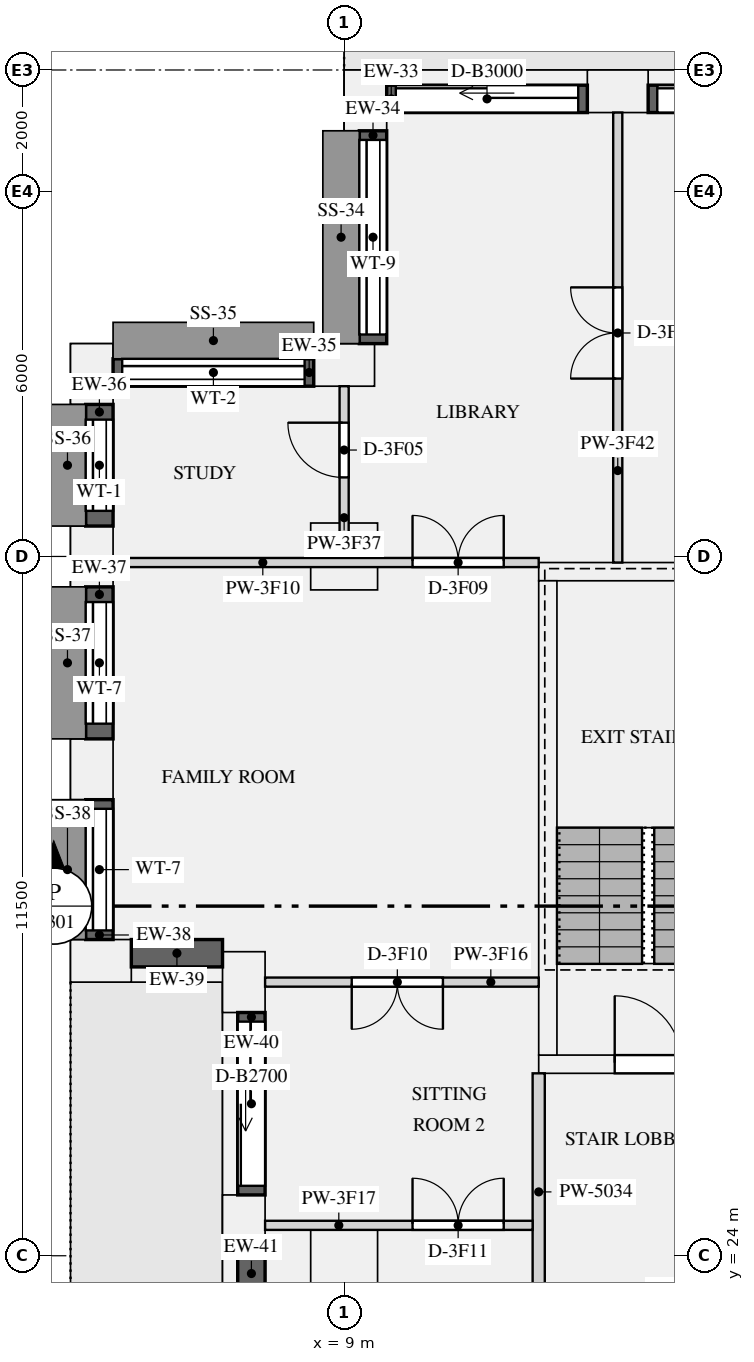
"""IFC4 building model, lengths in metres.
Left out: names, types, materials, properties, quantities, classifications, styles, units other than length and angle.
Written with IfcOpenShell. Run it as: python <this file> out.ifc"""

import sys

from ifc_helpers import new_model, si_unit, direction, frame, frame_2d, origin, origin_2d, place, context, subcontext, project, spatial, rectangle, extrude, element, fill, save


model = new_model("IFC4")
c1 = context("Model", 3, precision=1e-05, world=origin(), true_north=direction((0.0, 1.0)))
c2 = subcontext(c1, "Body", "Model", "MODEL_VIEW")
j1 = project(units=[si_unit("LENGTHUNIT", "METRE"), si_unit("PLANEANGLEUNIT", "RADIAN")], contexts=[c1])
p1 = place(None, origin())
s1 = spatial("IfcSite", under=j1, at=p1, CompositionType="ELEMENT")
p2 = place(p1, origin())
s2 = spatial("IfcBuilding", under=s1, at=p2, CompositionType="ELEMENT")
p3 = place(p2, frame((0.0, 0.0, 182.25)))
s3 = spatial("IfcBuildingStorey", under=s2, at=p3, CompositionType="ELEMENT", Elevation=182.25)
p4 = place(p3, frame((13.5, 43.15, 0.0), z_axis=(0.0, 0.0, 1.0), x_axis=(-1.0, 0.0, 0.0)))
e1 = element("IfcColumn", 1, at=p4, inside=s3, PredefinedType="USERDEFINED", context=c2, shape_type="SweptSolid", body=[
    extrude(rectangle(XDim=1.0, YDim=0.7, at=origin_2d()), origin(), (0.0, 0.0, 1.0), 2.65),
])
p5 = place(p3, frame((9.35, 43.0, 0.0), z_axis=(0.0, 0.0, 1.0), x_axis=(0.0, -1.0, 0.0)))
e2 = element("IfcColumn", 2, at=p5, inside=s3, PredefinedType="USERDEFINED", context=c2, shape_type="SweptSolid", body=[
    extrude(rectangle(XDim=1.0, YDim=0.7, at=origin_2d()), origin(), (0.0, 0.0, 1.0), 3.15),
])
p6 = place(p3, frame((9.0, 38.65, 0.0), z_axis=(0.0, 0.0, 1.0), x_axis=(-1.0, 0.0, 0.0)))
e3 = element("IfcColumn", 3, at=p6, inside=s3, PredefinedType="USERDEFINED", context=c2, shape_type="SweptSolid", body=[
    extrude(rectangle(XDim=1.0, YDim=0.7, at=origin_2d()), origin(), (0.0, 0.0, 1.0), 2.65),
])
p7 = place(p3, frame((4.85, 38.5, 0.0), z_axis=(0.0, 0.0, 1.0), x_axis=(0.0, -1.0, 0.0)))
e4 = element("IfcColumn", 4, at=p7, inside=s3, PredefinedType="USERDEFINED", context=c2, shape_type="SweptSolid", body=[
    extrude(rectangle(XDim=1.0, YDim=0.7, at=origin_2d()), origin(), (0.0, 0.0, 1.0), 3.15),
])
for number, where, z_axis, x_axis in (
    (5, (4.85, 35.5, 0.0), (0.0, 0.0, 1.0), (0.0, -1.0, 0.0)),
    (6, (4.85, 32.0, 0.0), (0.0, 0.0, 1.0), (0.0, -1.0, 0.0)),
    (7, (5.0, 28.85, 0.0), (0.0, 0.0, 1.0), (1.0, 0.0, 0.0)),
    (8, (7.35, 28.5, 0.0), (0.0, 0.0, 1.0), (0.0, -1.0, 0.0)),
    (9, (7.35, 24.5, 0.0), (0.0, 0.0, 1.0), (0.0, -1.0, 0.0)),
):
    element("IfcColumn", number, at=place(p3, frame(where, z_axis=z_axis, x_axis=x_axis)), inside=s3, PredefinedType="USERDEFINED", context=c2, shape_type="SweptSolid", body=[
        extrude(rectangle(XDim=1.0, YDim=0.7, at=origin_2d()), origin(), (0.0, 0.0, 1.0), 2.65),
    ])
for number, where, z_axis, x_axis in (
    (10, (9.0, 24.0, 0.0), (0.0, 0.0, 1.0), (1.0, 0.0, 0.0)),
    (11, (9.0, 35.5, 0.0), (0.0, 0.0, 1.0), (1.0, 0.0, 0.0)),
):
    element("IfcColumn", number, at=place(p3, frame(where, z_axis=z_axis, x_axis=x_axis)), inside=s3, PredefinedType="COLUMN", context=c2, shape_type="SweptSolid", body=[
        extrude(rectangle(XDim=1.1, YDim=1.1, at=origin_2d()), origin(), (0.0, 0.0, 1.0), 3.15),
    ])
p8 = place(p3, frame((12.2, 27.15, 0.0), z_axis=(0.0, 0.0, 1.0), x_axis=(1.0, 0.0, 0.0)))
e12 = element("IfcWall", 12, at=p8, inside=s3, PredefinedType="SHEAR", context=c2, shape_type="SweptSolid", body=[
    extrude(rectangle(XDim=3.6, YDim=0.3, at=frame_2d((1.8, 0.0))), origin(), (0.0, 0.0, 1.0), 3.15),
])
p9 = place(p8, frame((1.25, 0.0, 0.0)))
e13 = element("IfcOpeningElement", 13, at=p9, cuts=e12, PredefinedType="OPENING", context=c2, shape_type="SweptSolid", body=[
    extrude(rectangle(XDim=1.1, YDim=2.1, at=frame_2d((0.55, 1.05))), frame((0.0, 0.16, 0.0), z_axis=(0.0, -1.0, 0.0), x_axis=(1.0, 0.0, 0.0)), (0.0, 0.0, 1.0), 0.32),
])
p10 = place(p3, frame((12.2, 35.25, 0.0), z_axis=(0.0, 0.0, 1.0), x_axis=(1.0, 0.0, 0.0)))
e14 = element("IfcWall", 14, at=p10, inside=s3, PredefinedType="SHEAR", context=c2, shape_type="SweptSolid", body=[
    extrude(rectangle(XDim=3.6, YDim=0.3, at=frame_2d((1.8, 0.0))), origin(), (0.0, 0.0, 1.0), 3.15),
])
p11 = place(p3, frame((12.35, 27.3, 0.0), z_axis=(0.0, 0.0, 1.0), x_axis=(0.0, 1.0, 0.0)))
e15 = element("IfcWall", 15, at=p11, inside=s3, PredefinedType="SHEAR", context=c2, shape_type="SweptSolid", body=[
    extrude(rectangle(XDim=7.8, YDim=0.3, at=frame_2d((3.9, 0.0))), origin(), (0.0, 0.0, 1.0), 3.15),
])
p12 = place(p3, frame((17.5, 43.025, 0.0), z_axis=(0.0, 0.0, 1.0), x_axis=(-1.0, 0.0, 0.0)))
e16 = element("IfcWall", 16, at=p12, inside=s3, PredefinedType="SOLIDWALL", context=c2, shape_type="SweptSolid", body=[
    extrude(rectangle(XDim=3.5, YDim=0.45, at=frame_2d((1.75, 0.0))), origin(), (0.0, 0.0, 1.0), 2.65),
])
p13 = place(p12, frame((0.15, 0.0, 0.0)))
e17 = element("IfcOpeningElement", 17, at=p13, cuts=e16, PredefinedType="OPENING", context=c2, shape_type="SweptSolid", body=[
    extrude(rectangle(XDim=3.2, YDim=2.3, at=frame_2d((1.6, 1.15))), frame((0.0, 0.235, 0.0), z_axis=(0.0, -1.0, 0.0), x_axis=(1.0, 0.0, 0.0)), (0.0, 0.0, 1.0), 0.47),
])
p14 = place(p3, frame((13.0, 43.025, 0.0), z_axis=(0.0, 0.0, 1.0), x_axis=(-1.0, 0.0, 0.0)))
e18 = element("IfcWall", 18, at=p14, inside=s3, PredefinedType="SOLIDWALL", context=c2, shape_type="SweptSolid", body=[
    extrude(rectangle(XDim=3.3, YDim=0.45, at=frame_2d((1.65, 0.0))), origin(), (0.0, 0.0, 1.0), 2.65),
])
p15 = place(p14, frame((0.15, 0.0, 0.0)))
e19 = element("IfcOpeningElement", 19, at=p15, cuts=e18, PredefinedType="OPENING", context=c2, shape_type="SweptSolid", body=[
    extrude(rectangle(XDim=3.0, YDim=2.3, at=frame_2d((1.5, 1.15))), frame((0.0, 0.235, 0.0), z_axis=(0.0, -1.0, 0.0), x_axis=(1.0, 0.0, 0.0)), (0.0, 0.0, 1.0), 0.47),
])
p16 = place(p3, frame((9.475, 42.5, 0.9), z_axis=(0.0, 0.0, 1.0), x_axis=(0.0, -1.0, 0.0)))
e20 = element("IfcWall", 20, at=p16, inside=s3, PredefinedType="SOLIDWALL", context=c2, shape_type="SweptSolid", body=[
    extrude(rectangle(XDim=3.5, YDim=0.45, at=frame_2d((1.75, 0.0))), origin(), (0.0, 0.0, 1.0), 1.75),
])
p17 = place(p16, frame((0.15, 0.0, 0.15)))
e21 = element("IfcOpeningElement", 21, at=p17, cuts=e20, PredefinedType="OPENING", context=c2, shape_type="SweptSolid", body=[
    extrude(rectangle(XDim=3.2, YDim=1.5, at=frame_2d((1.6, 0.75))), frame((0.0, 0.235, 0.0), z_axis=(0.0, -1.0, 0.0), x_axis=(1.0, 0.0, 0.0)), (0.0, 0.0, 1.0), 0.47),
])
p18 = place(p3, frame((8.5, 38.525, 0.9), z_axis=(0.0, 0.0, 1.0), x_axis=(-1.0, 0.0, 0.0)))
e22 = element("IfcWall", 22, at=p18, inside=s3, PredefinedType="SOLIDWALL", context=c2, shape_type="SweptSolid", body=[
    extrude(rectangle(XDim=3.3, YDim=0.45, at=frame_2d((1.65, 0.0))), origin(), (0.0, 0.0, 1.0), 1.75),
])
p19 = place(p18, frame((0.15, 0.0, 0.15)))
e23 = element("IfcOpeningElement", 23, at=p19, cuts=e22, PredefinedType="OPENING", context=c2, shape_type="SweptSolid", body=[
    extrude(rectangle(XDim=3.0, YDim=1.5, at=frame_2d((1.5, 0.75))), frame((0.0, 0.235, 0.0), z_axis=(0.0, -1.0, 0.0), x_axis=(1.0, 0.0, 0.0)), (0.0, 0.0, 1.0), 0.47),
])
p20 = place(p3, frame((4.975, 38.0, 0.9), z_axis=(0.0, 0.0, 1.0), x_axis=(0.0, -1.0, 0.0)))
e24 = element("IfcWall", 24, at=p20, inside=s3, PredefinedType="SOLIDWALL", context=c2, shape_type="SweptSolid", body=[
    extrude(rectangle(XDim=2.0, YDim=0.45, at=frame_2d((1.0, 0.0))), origin(), (0.0, 0.0, 1.0), 1.75),
])
p21 = place(p20, frame((0.25, 0.0, 0.15)))
e25 = element("IfcOpeningElement", 25, at=p21, cuts=e24, PredefinedType="OPENING", context=c2, shape_type="SweptSolid", body=[
    extrude(rectangle(XDim=1.5, YDim=1.5, at=frame_2d((0.75, 0.75))), frame((0.0, 0.235, 0.0), z_axis=(0.0, -1.0, 0.0), x_axis=(1.0, 0.0, 0.0)), (0.0, 0.0, 1.0), 0.47),
])
p22 = place(p3, frame((4.975, 35.0, 0.9), z_axis=(0.0, 0.0, 1.0), x_axis=(0.0, -1.0, 0.0)))
e26 = element("IfcWall", 26, at=p22, inside=s3, PredefinedType="SOLIDWALL", context=c2, shape_type="SweptSolid", body=[
    extrude(rectangle(XDim=2.5, YDim=0.45, at=frame_2d((1.25, 0.0))), origin(), (0.0, 0.0, 1.0), 1.75),
])
p23 = place(p22, frame((0.25, 0.0, 0.15)))
e27 = element("IfcOpeningElement", 27, at=p23, cuts=e26, PredefinedType="OPENING", context=c2, shape_type="SweptSolid", body=[
    extrude(rectangle(XDim=2.0, YDim=1.5, at=frame_2d((1.0, 0.75))), frame((0.0, 0.235, 0.0), z_axis=(0.0, -1.0, 0.0), x_axis=(1.0, 0.0, 0.0)), (0.0, 0.0, 1.0), 0.47),
])
p24 = place(p3, frame((4.975, 31.5, 0.9), z_axis=(0.0, 0.0, 1.0), x_axis=(0.0, -1.0, 0.0)))
e28 = element("IfcWall", 28, at=p24, inside=s3, PredefinedType="SOLIDWALL", context=c2, shape_type="SweptSolid", body=[
    extrude(rectangle(XDim=2.3, YDim=0.45, at=frame_2d((1.15, 0.0))), origin(), (0.0, 0.0, 1.0), 1.75),
])
p25 = place(p24, frame((0.15, 0.0, 0.15)))
e29 = element("IfcOpeningElement", 29, at=p25, cuts=e28, PredefinedType="OPENING", context=c2, shape_type="SweptSolid", body=[
    extrude(rectangle(XDim=2.0, YDim=1.5, at=frame_2d((1.0, 0.75))), frame((0.0, 0.235, 0.0), z_axis=(0.0, -1.0, 0.0), x_axis=(1.0, 0.0, 0.0)), (0.0, 0.0, 1.0), 0.47),
])
p26 = place(p3, frame((5.5, 28.975, 0.9), z_axis=(0.0, 0.0, 1.0), x_axis=(1.0, 0.0, 0.0)))
e30 = element("IfcWall", 30, at=p26, inside=s3, PredefinedType="SOLIDWALL", context=c2, shape_type="SweptSolid", body=[
    extrude(rectangle(XDim=1.5, YDim=0.45, at=frame_2d((0.75, 0.0))), origin(), (0.0, 0.0, 1.0), 1.75),
])
p27 = place(p3, frame((7.475, 28.0, 0.0), z_axis=(0.0, 0.0, 1.0), x_axis=(0.0, -1.0, 0.0)))
e31 = element("IfcWall", 31, at=p27, inside=s3, PredefinedType="SOLIDWALL", context=c2, shape_type="SweptSolid", body=[
    extrude(rectangle(XDim=3.0, YDim=0.45, at=frame_2d((1.5, 0.0))), origin(), (0.0, 0.0, 1.0), 2.65),
])
p28 = place(p27, frame((0.15, 0.0, 0.0)))
e32 = element("IfcOpeningElement", 32, at=p28, cuts=e31, PredefinedType="OPENING", context=c2, shape_type="SweptSolid", body=[
    extrude(rectangle(XDim=2.7, YDim=2.3, at=frame_2d((1.35, 1.15))), frame((0.0, 0.235, 0.0), z_axis=(0.0, -1.0, 0.0), x_axis=(1.0, 0.0, 0.0)), (0.0, 0.0, 1.0), 0.47),
])
p29 = place(p3, frame((7.475, 24.0, 0.0), z_axis=(0.0, 0.0, 1.0), x_axis=(0.0, -1.0, 0.0)))
e33 = element("IfcWall", 33, at=p29, inside=s3, PredefinedType="SOLIDWALL", context=c2, shape_type="SweptSolid", body=[
    extrude(rectangle(XDim=3.0, YDim=0.45, at=frame_2d((1.5, 0.0))), origin(), (0.0, 0.0, 1.0), 2.65),
])
p30 = place(p29, frame((0.585, 0.0, 0.0)))
e34 = element("IfcOpeningElement", 34, at=p30, cuts=e33, PredefinedType="OPENING", context=c2, shape_type="SweptSolid", body=[
    extrude(rectangle(XDim=2.25, YDim=2.3, at=frame_2d((1.125, 1.15))), frame((0.0, 0.235, 0.0), z_axis=(0.0, -1.0, 0.0), x_axis=(1.0, 0.0, 0.0)), (0.0, 0.0, 1.0), 0.47),
])
p31 = place(p3, frame((12.2, 23.1, 0.0), z_axis=(0.0, 0.0, 1.0), x_axis=(0.0, 1.0, 0.0)))
e35 = element("IfcWall", 35, at=p31, inside=s3, PredefinedType="PARTITIONING", context=c2, shape_type="SweptSolid", body=[
    extrude(rectangle(XDim=3.9, YDim=0.2, at=frame_2d((1.95, 0.0))), origin(), (0.0, 0.0, 1.0), 2.65),
])
p32 = place(p3, frame((5.2, 35.4, 0.0), z_axis=(0.0, 0.0, 1.0), x_axis=(1.0, 0.0, 0.0)))
e36 = element("IfcWall", 36, at=p32, inside=s3, PredefinedType="PARTITIONING", context=c2, shape_type="SweptSolid", body=[
    extrude(rectangle(XDim=7.0, YDim=0.15, at=frame_2d((3.5, 0.0))), origin(), (0.0, 0.0, 1.0), 2.65),
])
p33 = place(p32, frame((4.925, 0.0, 0.0)))
e37 = element("IfcOpeningElement", 37, at=p33, cuts=e36, PredefinedType="OPENING", context=c2, shape_type="SweptSolid", body=[
    extrude(rectangle(XDim=1.5, YDim=2.1, at=frame_2d((0.75, 1.05))), frame((0.0, 0.085, 0.0), z_axis=(0.0, -1.0, 0.0), x_axis=(1.0, 0.0, 0.0)), (0.0, 0.0, 1.0), 0.17),
])
p34 = place(p3, frame((7.7, 28.5, 0.0), z_axis=(0.0, 0.0, 1.0), x_axis=(1.0, 0.0, 0.0)))
e38 = element("IfcWall", 38, at=p34, inside=s3, PredefinedType="PARTITIONING", context=c2, shape_type="SweptSolid", body=[
    extrude(rectangle(XDim=4.5, YDim=0.15, at=frame_2d((2.25, 0.0))), origin(), (0.0, 0.0, 1.0), 2.65),
])
p35 = place(p34, frame((1.425, 0.0, 0.0)))
e39 = element("IfcOpeningElement", 39, at=p35, cuts=e38, PredefinedType="OPENING", context=c2, shape_type="SweptSolid", body=[
    extrude(rectangle(XDim=1.5, YDim=2.1, at=frame_2d((0.75, 1.05))), frame((0.0, 0.085, 0.0), z_axis=(0.0, -1.0, 0.0), x_axis=(1.0, 0.0, 0.0)), (0.0, 0.0, 1.0), 0.17),
])
p36 = place(p3, frame((7.7, 24.5, 0.0), z_axis=(0.0, 0.0, 1.0), x_axis=(1.0, 0.0, 0.0)))
e40 = element("IfcWall", 40, at=p36, inside=s3, PredefinedType="PARTITIONING", context=c2, shape_type="SweptSolid", body=[
    extrude(rectangle(XDim=4.4, YDim=0.15, at=frame_2d((2.2, 0.0))), origin(), (0.0, 0.0, 1.0), 2.65),
])
p37 = place(p36, frame((2.425, 0.0, 0.0)))
e41 = element("IfcOpeningElement", 41, at=p37, cuts=e40, PredefinedType="OPENING", context=c2, shape_type="SweptSolid", body=[
    extrude(rectangle(XDim=1.5, YDim=2.1, at=frame_2d((0.75, 1.05))), frame((0.0, 0.085, 0.0), z_axis=(0.0, -1.0, 0.0), x_axis=(1.0, 0.0, 0.0)), (0.0, 0.0, 1.0), 0.17),
])
p38 = place(p3, frame((9.0, 35.475, 0.0), z_axis=(0.0, 0.0, 1.0), x_axis=(0.0, 1.0, 0.0)))
e42 = element("IfcWall", 42, at=p38, inside=s3, PredefinedType="PARTITIONING", context=c2, shape_type="SweptSolid", body=[
    extrude(rectangle(XDim=2.825, YDim=0.15, at=frame_2d((1.413, 0.0))), origin(), (0.0, 0.0, 1.0), 2.65),
])
p39 = place(p38, frame((1.325, 0.0, 0.0)))
e43 = element("IfcOpeningElement", 43, at=p39, cuts=e42, PredefinedType="OPENING", context=c2, shape_type="SweptSolid", body=[
    extrude(rectangle(XDim=0.9, YDim=2.1, at=frame_2d((0.45, 1.05))), frame((0.0, 0.085, 0.0), z_axis=(0.0, -1.0, 0.0), x_axis=(1.0, 0.0, 0.0)), (0.0, 0.0, 1.0), 0.17),
])
p40 = place(p3, frame((13.5, 35.4, 0.0), z_axis=(0.0, 0.0, 1.0), x_axis=(0.0, 1.0, 0.0)))
e44 = element("IfcWall", 44, at=p40, inside=s3, PredefinedType="PARTITIONING", context=c2, shape_type="SweptSolid", body=[
    extrude(rectangle(XDim=7.4, YDim=0.15, at=frame_2d((3.7, 0.0))), origin(), (0.0, 0.0, 1.0), 2.65),
])
p41 = place(p40, frame((3.025, 0.0, 0.0)))
e45 = element("IfcOpeningElement", 45, at=p41, cuts=e44, PredefinedType="OPENING", context=c2, shape_type="SweptSolid", body=[
    extrude(rectangle(XDim=1.5, YDim=2.1, at=frame_2d((0.75, 1.05))), frame((0.0, 0.085, 0.0), z_axis=(0.0, -1.0, 0.0), x_axis=(1.0, 0.0, 0.0)), (0.0, 0.0, 1.0), 0.17),
])
p42 = place(p13, origin())
e46 = element("IfcDoor", 46, at=p42, inside=s3, OperationType="SLIDING_TO_LEFT", PredefinedType="DOOR", context=c2, shape_type="SweptSolid", body=[
    extrude(rectangle(XDim=3.2, YDim=2.3, at=frame_2d((1.6, 1.15))), frame((0.0, -0.07, 0.0), z_axis=(0.0, -1.0, 0.0), x_axis=(1.0, 0.0, 0.0)), (0.0, 0.0, 1.0), 0.05),
])
fill(e17, e46)
p43 = place(p15, origin())
e47 = element("IfcDoor", 47, at=p43, inside=s3, OperationType="SLIDING_TO_LEFT", PredefinedType="DOOR", context=c2, shape_type="SweptSolid", body=[
    extrude(rectangle(XDim=3.0, YDim=2.3, at=frame_2d((1.5, 1.15))), frame((0.0, -0.07, 0.0), z_axis=(0.0, -1.0, 0.0), x_axis=(1.0, 0.0, 0.0)), (0.0, 0.0, 1.0), 0.05),
])
fill(e19, e47)
p44 = place(p17, origin())
e48 = element("IfcWindow", 48, at=p44, inside=s3, PartitioningType="SINGLE_PANEL", PredefinedType="WINDOW", context=c2, shape_type="SweptSolid", body=[
    extrude(rectangle(XDim=3.2, YDim=1.5, at=frame_2d((1.6, 0.75))), frame((0.0, -0.065, 0.0), z_axis=(0.0, -1.0, 0.0), x_axis=(1.0, 0.0, 0.0)), (0.0, 0.0, 1.0), 0.06),
])
fill(e21, e48)
p45 = place(p19, origin())
e49 = element("IfcWindow", 49, at=p45, inside=s3, PartitioningType="SINGLE_PANEL", PredefinedType="WINDOW", context=c2, shape_type="SweptSolid", body=[
    extrude(rectangle(XDim=3.0, YDim=1.5, at=frame_2d((1.5, 0.75))), frame((0.0, -0.065, 0.0), z_axis=(0.0, -1.0, 0.0), x_axis=(1.0, 0.0, 0.0)), (0.0, 0.0, 1.0), 0.06),
])
fill(e23, e49)
p46 = place(p21, origin())
e50 = element("IfcWindow", 50, at=p46, inside=s3, PartitioningType="SINGLE_PANEL", PredefinedType="WINDOW", context=c2, shape_type="SweptSolid", body=[
    extrude(rectangle(XDim=1.5, YDim=1.5, at=frame_2d((0.75, 0.75))), frame((0.0, -0.065, 0.0), z_axis=(0.0, -1.0, 0.0), x_axis=(1.0, 0.0, 0.0)), (0.0, 0.0, 1.0), 0.06),
])
fill(e25, e50)
p47 = place(p23, origin())
e51 = element("IfcWindow", 51, at=p47, inside=s3, PartitioningType="SINGLE_PANEL", PredefinedType="WINDOW", context=c2, shape_type="SweptSolid", body=[
    extrude(rectangle(XDim=2.0, YDim=1.5, at=frame_2d((1.0, 0.75))), frame((0.0, -0.065, 0.0), z_axis=(0.0, -1.0, 0.0), x_axis=(1.0, 0.0, 0.0)), (0.0, 0.0, 1.0), 0.06),
])
fill(e27, e51)
p48 = place(p25, origin())
e52 = element("IfcWindow", 52, at=p48, inside=s3, PartitioningType="SINGLE_PANEL", PredefinedType="WINDOW", context=c2, shape_type="SweptSolid", body=[
    extrude(rectangle(XDim=2.0, YDim=1.5, at=frame_2d((1.0, 0.75))), frame((0.0, -0.065, 0.0), z_axis=(0.0, -1.0, 0.0), x_axis=(1.0, 0.0, 0.0)), (0.0, 0.0, 1.0), 0.06),
])
fill(e29, e52)
p49 = place(p28, origin())
e53 = element("IfcDoor", 53, at=p49, inside=s3, OperationType="SLIDING_TO_LEFT", PredefinedType="DOOR", context=c2, shape_type="SweptSolid", body=[
    extrude(rectangle(XDim=2.7, YDim=2.3, at=frame_2d((1.35, 1.15))), frame((0.0, -0.07, 0.0), z_axis=(0.0, -1.0, 0.0), x_axis=(1.0, 0.0, 0.0)), (0.0, 0.0, 1.0), 0.05),
])
fill(e32, e53)
p50 = place(p9, origin())
e54 = element("IfcDoor", 54, at=p50, inside=s3, OperationType="SINGLE_SWING_LEFT", PredefinedType="DOOR", context=c2, shape_type="SweptSolid", body=[
    extrude(rectangle(XDim=1.1, YDim=2.1, at=frame_2d((0.55, 1.05))), frame((0.0, 0.025, 0.0), z_axis=(0.0, -1.0, 0.0), x_axis=(1.0, 0.0, 0.0)), (0.0, 0.0, 1.0), 0.05),
])
fill(e13, e54)
p51 = place(p39, origin())
e55 = element("IfcDoor", 55, at=p51, inside=s3, OperationType="SINGLE_SWING_RIGHT", PredefinedType="DOOR", context=c2, shape_type="SweptSolid", body=[
    extrude(rectangle(XDim=0.9, YDim=2.1, at=frame_2d((0.45, 1.05))), frame((0.0, 0.025, 0.0), z_axis=(0.0, -1.0, 0.0), x_axis=(1.0, 0.0, 0.0)), (0.0, 0.0, 1.0), 0.05),
])
fill(e43, e55)
p52 = place(p41, origin())
e56 = element("IfcDoor", 56, at=p52, inside=s3, OperationType="DOUBLE_DOOR_SINGLE_SWING", PredefinedType="DOOR", context=c2, shape_type="SweptSolid", body=[
    extrude(rectangle(XDim=1.5, YDim=2.1, at=frame_2d((0.75, 1.05))), frame((0.0, 0.025, 0.0), z_axis=(0.0, -1.0, 0.0), x_axis=(1.0, 0.0, 0.0)), (0.0, 0.0, 1.0), 0.05),
])
fill(e45, e56)
p53 = place(p33, origin())
e57 = element("IfcDoor", 57, at=p53, inside=s3, OperationType="DOUBLE_DOOR_SINGLE_SWING", PredefinedType="DOOR", context=c2, shape_type="SweptSolid", body=[
    extrude(rectangle(XDim=1.5, YDim=2.1, at=frame_2d((0.75, 1.05))), frame((0.0, 0.025, 0.0), z_axis=(0.0, -1.0, 0.0), x_axis=(1.0, 0.0, 0.0)), (0.0, 0.0, 1.0), 0.05),
])
fill(e37, e57)
p54 = place(p35, frame((1.5, 0.0, 0.0), z_axis=(0.0, 0.0, 1.0), x_axis=(-1.0, 0.0, 0.0)))
e58 = element("IfcDoor", 58, at=p54, inside=s3, OperationType="DOUBLE_DOOR_SINGLE_SWING", PredefinedType="DOOR", context=c2, shape_type="SweptSolid", body=[
    extrude(rectangle(XDim=1.5, YDim=2.1, at=frame_2d((0.75, 1.05))), frame((0.0, 0.025, 0.0), z_axis=(0.0, -1.0, 0.0), x_axis=(1.0, 0.0, 0.0)), (0.0, 0.0, 1.0), 0.05),
])
fill(e39, e58)
p55 = place(p37, origin())
e59 = element("IfcDoor", 59, at=p55, inside=s3, OperationType="DOUBLE_DOOR_SINGLE_SWING", PredefinedType="DOOR", context=c2, shape_type="SweptSolid", body=[
    extrude(rectangle(XDim=1.5, YDim=2.1, at=frame_2d((0.75, 1.05))), frame((0.0, 0.025, 0.0), z_axis=(0.0, -1.0, 0.0), x_axis=(1.0, 0.0, 0.0)), (0.0, 0.0, 1.0), 0.05),
])
fill(e41, e59)
save(model, sys.argv[1])
